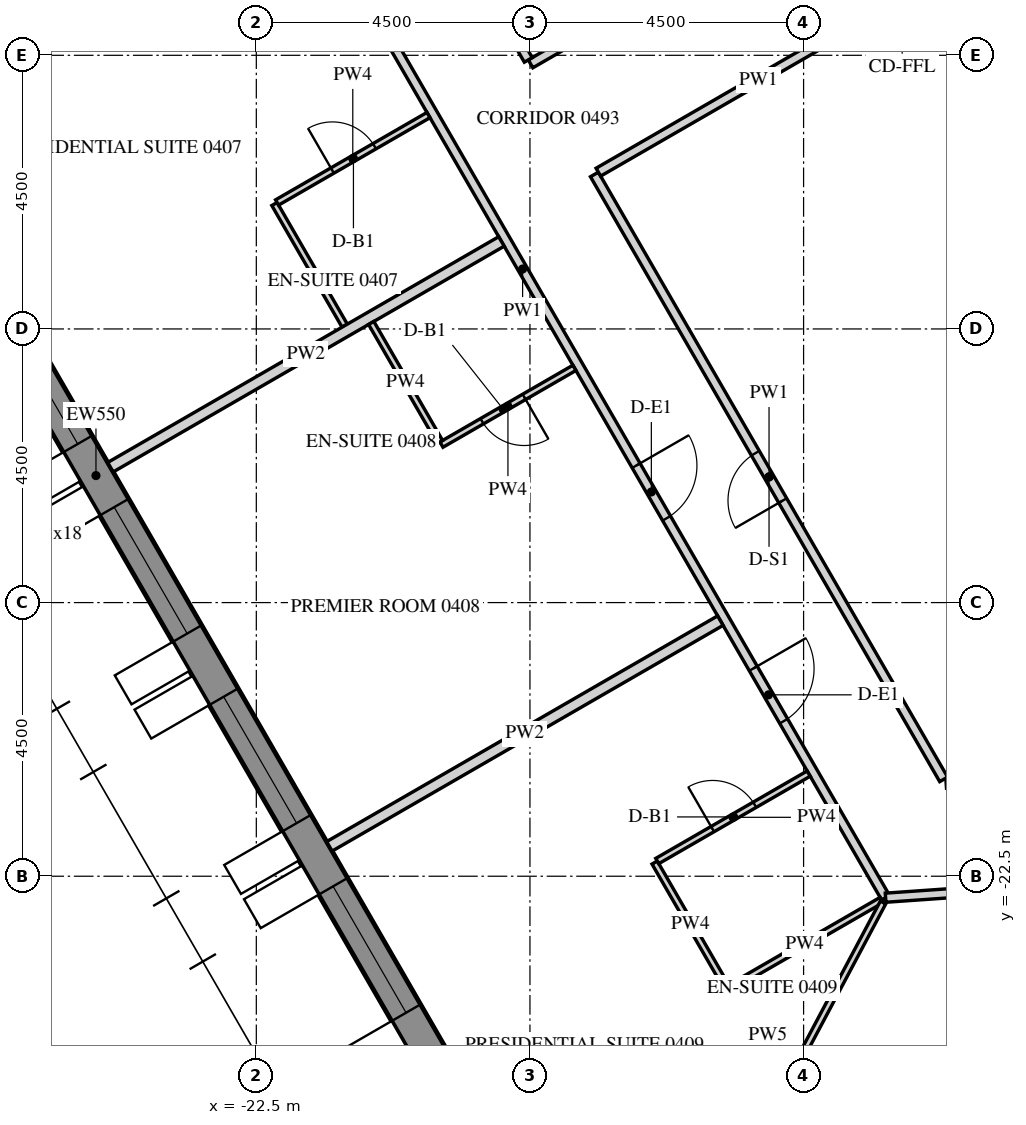
"""IFC4 building model, lengths in metres.
Left out: names, types, materials, properties, quantities, classifications, styles, units other than length and angle.
Written with IfcOpenShell. Run it as: python <this file> out.ifc"""

import sys

from ifc_helpers import new_model, si_unit, direction, frame, frame_2d, origin, place, context, subcontext, project, spatial, polyline, rectangle, outline, extrude, element, fill, save


model = new_model("IFC4")
c1 = context("Model", 3, precision=1e-05, world=origin(), true_north=direction((0.0, 1.0)))
c2 = subcontext(c1, "Body", "Model", "MODEL_VIEW")
j1 = project(units=[si_unit("LENGTHUNIT", "METRE"), si_unit("PLANEANGLEUNIT", "RADIAN")], contexts=[c1])
p1 = place(None, origin())
s1 = spatial("IfcSite", under=j1, at=p1, CompositionType="ELEMENT")
p2 = place(p1, origin())
s2 = spatial("IfcBuilding", under=s1, at=p2, CompositionType="ELEMENT")
p3 = place(p2, frame((0.0, 0.0, 68.7)))
s3 = spatial("IfcBuildingStorey", under=s2, at=p3, CompositionType="ELEMENT", Elevation=68.7)
p4 = place(p3, frame((-32.655, -2.89, -0.15), z_axis=(0.0, 0.0, 1.0), x_axis=(0.499997711317, -0.866026725152, 0.0)))
e1 = element("IfcWall", 1, at=p4, inside=s3, PredefinedType="SOLIDWALL", context=c2, shape_type="SweptSolid", body=[
    extrude(outline(polyline([(-0.022, -0.275), (30.097, -0.275), (30.045, 0.275), (0.022, 0.275), (-0.022, -0.275)])), origin(), (0.0, 0.0, 1.0), 3.9),
])
p5 = place(p4, frame((1.236, 0.0, 1.05)))
e2 = element("IfcOpeningElement", 2, at=p5, cuts=e1, PredefinedType="OPENING", context=c2, shape_type="SweptSolid", body=[
    extrude(rectangle(XDim=2.4, YDim=2.4, at=frame_2d((1.2, 1.2))), frame((0.0, 0.285, 0.0), z_axis=(0.0, -1.0, 0.0), x_axis=(1.0, 0.0, 0.0)), (0.0, 0.0, 1.0), 0.57),
])
p6 = place(p4, frame((4.835, 0.0, 1.05)))
e3 = element("IfcOpeningElement", 3, at=p6, cuts=e1, PredefinedType="OPENING", context=c2, shape_type="SweptSolid", body=[
    extrude(rectangle(XDim=2.4, YDim=2.4, at=frame_2d((1.2, 1.2))), frame((0.0, 0.285, 0.0), z_axis=(0.0, -1.0, 0.0), x_axis=(1.0, 0.0, 0.0)), (0.0, 0.0, 1.0), 0.57),
])
p7 = place(p4, frame((8.436, 0.0, 1.05)))
e4 = element("IfcOpeningElement", 4, at=p7, cuts=e1, PredefinedType="OPENING", context=c2, shape_type="SweptSolid", body=[
    extrude(rectangle(XDim=2.4, YDim=2.4, at=frame_2d((1.2, 1.2))), frame((0.0, 0.285, 0.0), z_axis=(0.0, -1.0, 0.0), x_axis=(1.0, 0.0, 0.0)), (0.0, 0.0, 1.0), 0.57),
])
p8 = place(p4, frame((12.035, 0.0, 1.05)))
e5 = element("IfcOpeningElement", 5, at=p8, cuts=e1, PredefinedType="OPENING", context=c2, shape_type="SweptSolid", body=[
    extrude(rectangle(XDim=2.4, YDim=2.4, at=frame_2d((1.2, 1.2))), frame((0.0, 0.285, 0.0), z_axis=(0.0, -1.0, 0.0), x_axis=(1.0, 0.0, 0.0)), (0.0, 0.0, 1.0), 0.57),
])
p9 = place(p4, frame((15.635, 0.0, 1.05)))
e6 = element("IfcOpeningElement", 6, at=p9, cuts=e1, PredefinedType="OPENING", context=c2, shape_type="SweptSolid", body=[
    extrude(rectangle(XDim=2.4, YDim=2.4, at=frame_2d((1.2, 1.2))), frame((0.0, 0.285, 0.0), z_axis=(0.0, -1.0, 0.0), x_axis=(1.0, 0.0, 0.0)), (0.0, 0.0, 1.0), 0.57),
])
p10 = place(p4, frame((19.236, 0.0, 1.05)))
e7 = element("IfcOpeningElement", 7, at=p10, cuts=e1, PredefinedType="OPENING", context=c2, shape_type="SweptSolid", body=[
    extrude(rectangle(XDim=2.4, YDim=2.4, at=frame_2d((1.2, 1.2))), frame((0.0, 0.285, 0.0), z_axis=(0.0, -1.0, 0.0), x_axis=(1.0, 0.0, 0.0)), (0.0, 0.0, 1.0), 0.57),
])
p11 = place(p4, frame((22.835, 0.0, 1.05)))
e8 = element("IfcOpeningElement", 8, at=p11, cuts=e1, PredefinedType="OPENING", context=c2, shape_type="SweptSolid", body=[
    extrude(rectangle(XDim=2.4, YDim=2.4, at=frame_2d((1.2, 1.2))), frame((0.0, 0.285, 0.0), z_axis=(0.0, -1.0, 0.0), x_axis=(1.0, 0.0, 0.0)), (0.0, 0.0, 1.0), 0.57),
])
p12 = place(p4, frame((26.436, 0.0, 1.05)))
e9 = element("IfcOpeningElement", 9, at=p12, cuts=e1, PredefinedType="OPENING", context=c2, shape_type="SweptSolid", body=[
    extrude(rectangle(XDim=2.4, YDim=2.4, at=frame_2d((1.2, 1.2))), frame((0.0, 0.285, 0.0), z_axis=(0.0, -1.0, 0.0), x_axis=(1.0, 0.0, 0.0)), (0.0, 0.0, 1.0), 0.57),
])
p13 = place(p3, frame((-15.819, 0.0, -0.15), z_axis=(0.0, 0.0, 1.0), x_axis=(0.499999880136, -0.866025472988, 0.0)))
e10 = element("IfcWall", 10, at=p13, inside=s3, PredefinedType="SHEAR", context=c2, shape_type="SweptSolid", body=[
    extrude(outline(polyline([(-0.173, -0.3), (15.993, -0.3), (15.646, 0.3), (0.173, 0.3), (-0.173, -0.3)])), origin(), (0.0, 0.0, 1.0), 3.9),
])
p14 = place(p13, frame((6.981, 0.0, 0.15)))
e11 = element("IfcOpeningElement", 11, at=p14, cuts=e10, PredefinedType="OPENING", context=c2, shape_type="SweptSolid", body=[
    extrude(rectangle(XDim=1.8, YDim=2.4, at=frame_2d((0.9, 1.2))), frame((0.0, 0.31, 0.0), z_axis=(0.0, -1.0, 0.0), x_axis=(1.0, 0.0, 0.0)), (0.0, 0.0, 1.0), 0.62),
])
p15 = place(p3, frame((-11.345, 0.0, -0.15), z_axis=(0.0, 0.0, 1.0), x_axis=(0.499995046907, -0.866028263435, 0.0)))
e12 = element("IfcWall", 12, at=p15, inside=s3, PredefinedType="SHEAR", context=c2, shape_type="SweptSolid", body=[
    extrude(outline(polyline([(-0.101, -0.175), (11.446, -0.175), (11.244, 0.175), (0.101, 0.175), (-0.101, -0.175)])), origin(), (0.0, 0.0, 1.0), 3.9),
])
p16 = place(p15, frame((4.744, 0.0, 0.15)))
e13 = element("IfcOpeningElement", 13, at=p16, cuts=e12, PredefinedType="OPENING", context=c2, shape_type="SweptSolid", body=[
    extrude(rectangle(XDim=1.8, YDim=2.4, at=frame_2d((0.9, 1.2))), frame((0.0, 0.185, 0.0), z_axis=(0.0, -1.0, 0.0), x_axis=(1.0, 0.0, 0.0)), (0.0, 0.0, 1.0), 0.37),
])
p17 = place(p3, frame((-24.09, -2.175, 0.0), z_axis=(0.0, 0.0, 1.0), x_axis=(0.499996832073, -0.86602723278, 0.0)))
e14 = element("IfcWall", 14, at=p17, inside=s3, PredefinedType="PARTITIONING", context=c2, shape_type="SweptSolid", body=[
    extrude(rectangle(XDim=23.877, YDim=0.15, at=frame_2d((11.938, 0.0))), origin(), (0.0, 0.0, 1.0), 2.988),
])
p18 = place(p17, frame((3.943, 0.0, 0.0)))
e15 = element("IfcOpeningElement", 15, at=p18, cuts=e14, PredefinedType="OPENING", context=c2, shape_type="SweptSolid", body=[
    extrude(rectangle(XDim=1.0, YDim=2.1, at=frame_2d((0.5, 1.05))), frame((0.0, 0.085, 0.0), z_axis=(0.0, -1.0, 0.0), x_axis=(1.0, 0.0, 0.0)), (0.0, 0.0, 1.0), 0.17),
])
p19 = place(p17, frame((15.672, 0.0, 0.0)))
e16 = element("IfcOpeningElement", 16, at=p19, cuts=e14, PredefinedType="OPENING", context=c2, shape_type="SweptSolid", body=[
    extrude(rectangle(XDim=1.0, YDim=2.1, at=frame_2d((0.5, 1.05))), frame((0.0, 0.085, 0.0), z_axis=(0.0, -1.0, 0.0), x_axis=(1.0, 0.0, 0.0)), (0.0, 0.0, 1.0), 0.17),
])
p20 = place(p17, frame((19.525, 0.0, 0.0)))
e17 = element("IfcOpeningElement", 17, at=p20, cuts=e14, PredefinedType="OPENING", context=c2, shape_type="SweptSolid", body=[
    extrude(rectangle(XDim=1.0, YDim=2.1, at=frame_2d((0.5, 1.05))), frame((0.0, 0.085, 0.0), z_axis=(0.0, -1.0, 0.0), x_axis=(1.0, 0.0, 0.0)), (0.0, 0.0, 1.0), 0.17),
])
p21 = place(p3, frame((-12.151, -22.853, 0.0), z_axis=(0.0, 0.0, 1.0), x_axis=(0.99756425444, 0.069753553767, 0.0)))
e18 = element("IfcWall", 18, at=p21, inside=s3, PredefinedType="PARTITIONING", context=c2, shape_type="SweptSolid", body=[
    extrude(rectangle(XDim=22.085, YDim=0.15, at=frame_2d((11.042, 0.0))), origin(), (0.0, 0.0, 1.0), 2.988),
])
p22 = place(p21, frame((7.205, 0.0, 0.0)))
e19 = element("IfcOpeningElement", 19, at=p22, cuts=e18, PredefinedType="OPENING", context=c2, shape_type="SweptSolid", body=[
    extrude(rectangle(XDim=1.0, YDim=2.1, at=frame_2d((0.5, 1.05))), frame((0.0, 0.085, 0.0), z_axis=(0.0, -1.0, 0.0), x_axis=(1.0, 0.0, 0.0)), (0.0, 0.0, 1.0), 0.17),
])
p23 = place(p21, frame((17.995, 0.0, 0.0)))
e20 = element("IfcOpeningElement", 20, at=p23, cuts=e18, PredefinedType="OPENING", context=c2, shape_type="SweptSolid", body=[
    extrude(rectangle(XDim=1.0, YDim=2.1, at=frame_2d((0.5, 1.05))), frame((0.0, 0.085, 0.0), z_axis=(0.0, -1.0, 0.0), x_axis=(1.0, 0.0, 0.0)), (0.0, 0.0, 1.0), 0.17),
])
p24 = place(p3, frame((-12.664, -6.066, 0.0), z_axis=(0.0, 0.0, 1.0), x_axis=(-0.866023618125, -0.500003092839, 0.0)))
e21 = element("IfcWall", 21, at=p24, inside=s3, PredefinedType="PARTITIONING", context=c2, shape_type="SweptSolid", body=[
    extrude(rectangle(XDim=6.15, YDim=0.15, at=frame_2d((3.075, 0.0))), origin(), (0.0, 0.0, 1.0), 2.988),
])
p25 = place(p3, frame((-18.027, -9.076, 0.0), z_axis=(0.0, 0.0, 1.0), x_axis=(-0.500007318041, 0.86602117867, 0.0)))
e22 = element("IfcWall", 22, at=p25, inside=s3, PredefinedType="PARTITIONING", context=c2, shape_type="SweptSolid", body=[
    extrude(rectangle(XDim=8.383, YDim=0.15, at=frame_2d((4.191, 0.0))), origin(), (0.0, 0.0, 1.0), 2.988),
])
p26 = place(p25, frame((3.742, 0.0, 0.0)))
e23 = element("IfcOpeningElement", 23, at=p26, cuts=e22, PredefinedType="OPENING", context=c2, shape_type="SweptSolid", body=[
    extrude(rectangle(XDim=0.9, YDim=2.1, at=frame_2d((0.45, 1.05))), frame((0.0, 0.085, 0.0), z_axis=(0.0, -1.0, 0.0), x_axis=(1.0, 0.0, 0.0)), (0.0, 0.0, 1.0), 0.17),
])
p27 = place(p3, frame((-0.825, -20.257, 0.0), z_axis=(0.0, 0.0, 1.0), x_axis=(-0.9975635143, -0.069764137903, 0.0)))
e24 = element("IfcWall", 24, at=p27, inside=s3, PredefinedType="PARTITIONING", context=c2, shape_type="SweptSolid", body=[
    extrude(rectangle(XDim=10.355, YDim=0.15, at=frame_2d((5.177, 0.0))), origin(), (0.0, 0.0, 1.0), 2.988),
])
p28 = place(p3, frame((-11.197, -20.907, 0.0), z_axis=(0.0, 0.0, 1.0), x_axis=(-0.500004557924, 0.86602277225, 0.0)))
e25 = element("IfcWall", 25, at=p28, inside=s3, PredefinedType="PARTITIONING", context=c2, shape_type="SweptSolid", body=[
    extrude(rectangle(XDim=11.487, YDim=0.15, at=frame_2d((5.743, 0.0))), origin(), (0.0, 0.0, 1.0), 2.988),
])
p29 = place(p28, frame((5.293, 0.0, 0.0)))
e26 = element("IfcOpeningElement", 26, at=p29, cuts=e25, PredefinedType="OPENING", context=c2, shape_type="SweptSolid", body=[
    extrude(rectangle(XDim=0.9, YDim=2.1, at=frame_2d((0.45, 1.05))), frame((0.0, 0.085, 0.0), z_axis=(0.0, -1.0, 0.0), x_axis=(1.0, 0.0, 0.0)), (0.0, 0.0, 1.0), 0.17),
])
p30 = place(p3, frame((-16.875, -10.922, 0.0), z_axis=(0.0, 0.0, 1.0), x_axis=(0.866023634079, 0.500003065207, 0.0)))
e27 = element("IfcWall", 27, at=p30, inside=s3, PredefinedType="PARTITIONING", context=c2, shape_type="SweptSolid", body=[
    extrude(rectangle(XDim=6.075, YDim=0.15, at=frame_2d((3.038, 0.0))), origin(), (0.0, 0.0, 1.0), 2.988),
])
p31 = place(p3, frame((-21.047, -13.446, 0.0), z_axis=(0.0, 0.0, 1.0), x_axis=(-0.500015210774, 0.866016621662, 0.0)))
e28 = element("IfcWall", 28, at=p31, inside=s3, PredefinedType="PARTITIONING", context=c2, shape_type="SweptSolid", body=[
    extrude(rectangle(XDim=2.31, YDim=0.1, at=frame_2d((1.155, 0.0))), origin(), (0.0, 0.0, 1.0), 2.988),
])
p32 = place(p3, frame((-22.158, -11.42, 0.0), z_axis=(0.0, 0.0, 1.0), x_axis=(0.866018712932, 0.500011588718, 0.0)))
e29 = element("IfcWall", 29, at=p32, inside=s3, PredefinedType="PARTITIONING", context=c2, shape_type="SweptSolid", body=[
    extrude(rectangle(XDim=2.875, YDim=0.1, at=frame_2d((1.438, 0.0))), origin(), (0.0, 0.0, 1.0), 2.988),
])
p33 = place(p32, frame((1.05, 0.0, 0.0)))
e30 = element("IfcOpeningElement", 30, at=p33, cuts=e29, PredefinedType="OPENING", context=c2, shape_type="SweptSolid", body=[
    extrude(rectangle(XDim=0.8, YDim=2.1, at=frame_2d((0.4, 1.05))), frame((0.0, 0.06, 0.0), z_axis=(0.0, -1.0, 0.0), x_axis=(1.0, 0.0, 0.0)), (0.0, 0.0, 1.0), 0.12),
])
p34 = place(p3, frame((-25.684, -7.913, 0.0), z_axis=(0.0, 0.0, 1.0), x_axis=(-0.866034226713, -0.499984717929, 0.0)))
e31 = element("IfcWall", 31, at=p34, inside=s3, PredefinedType="PARTITIONING", context=c2, shape_type="SweptSolid", body=[
    extrude(rectangle(XDim=3.25, YDim=0.1, at=frame_2d((1.625, 0.0))), origin(), (0.0, 0.0, 1.0), 2.988),
])
p35 = place(p3, frame((-24.899, -15.774, 0.0), z_axis=(0.0, 0.0, 1.0), x_axis=(0.866028983062, 0.499993800457, 0.0)))
e32 = element("IfcWall", 32, at=p35, inside=s3, PredefinedType="PARTITIONING", context=c2, shape_type="SweptSolid", body=[
    extrude(rectangle(XDim=7.425, YDim=0.18, at=frame_2d((3.712, 0.0))), origin(), (0.0, 0.0, 1.0), 2.988),
])
p36 = place(p3, frame((-17.269, -14.14, 0.0), z_axis=(0.0, 0.0, 1.0), x_axis=(-0.865973021571, -0.500090717682, 0.0)))
e33 = element("IfcWall", 33, at=p36, inside=s3, PredefinedType="PARTITIONING", context=c2, shape_type="SweptSolid", body=[
    extrude(rectangle(XDim=2.525, YDim=0.1, at=frame_2d((1.262, 0.0))), origin(), (0.0, 0.0, 1.0), 2.988),
])
p37 = place(p36, frame((0.955, 0.0, 0.0)))
e34 = element("IfcOpeningElement", 34, at=p37, cuts=e33, PredefinedType="OPENING", context=c2, shape_type="SweptSolid", body=[
    extrude(rectangle(XDim=0.8, YDim=2.1, at=frame_2d((0.4, 1.05))), frame((0.0, 0.06, 0.0), z_axis=(0.0, -1.0, 0.0), x_axis=(1.0, 0.0, 0.0)), (0.0, 0.0, 1.0), 0.12),
])
p38 = place(p3, frame((-19.48, -15.359, 0.0), z_axis=(0.0, 0.0, 1.0), x_axis=(-0.4999967785, 0.866027263711, 0.0)))
e35 = element("IfcWall", 35, at=p38, inside=s3, PredefinedType="PARTITIONING", context=c2, shape_type="SweptSolid", body=[
    extrude(rectangle(XDim=2.26, YDim=0.1, at=frame_2d((1.13, 0.0))), origin(), (0.0, 0.0, 1.0), 2.988),
])
p39 = place(p3, frame((-21.299, -22.009, 0.0), z_axis=(0.0, 0.0, 1.0), x_axis=(0.866014745021, 0.500018461065, 0.0)))
e36 = element("IfcWall", 36, at=p39, inside=s3, PredefinedType="PARTITIONING", context=c2, shape_type="SweptSolid", body=[
    extrude(rectangle(XDim=7.425, YDim=0.18, at=frame_2d((3.712, 0.0))), origin(), (0.0, 0.0, 1.0), 2.988),
])
p40 = place(p3, frame((-12.216, -22.891, 0.0), z_axis=(0.0, 0.0, 1.0), x_axis=(-0.866046596414, -0.499963291492, 0.0)))
e37 = element("IfcWall", 37, at=p40, inside=s3, PredefinedType="PARTITIONING", context=c2, shape_type="SweptSolid", body=[
    extrude(rectangle(XDim=2.925, YDim=0.1, at=frame_2d((1.462, 0.0))), origin(), (0.0, 0.0, 1.0), 2.988),
])
p41 = place(p3, frame((-14.774, -24.31, 0.0), z_axis=(0.0, 0.0, 1.0), x_axis=(-0.500016218704, 0.866016039709, 0.0)))
e38 = element("IfcWall", 38, at=p41, inside=s3, PredefinedType="PARTITIONING", context=c2, shape_type="SweptSolid", body=[
    extrude(rectangle(XDim=2.35, YDim=0.1, at=frame_2d((1.175, 0.0))), origin(), (0.0, 0.0, 1.0), 2.988),
])
p42 = place(p3, frame((-15.906, -22.25, 0.0), z_axis=(0.0, 0.0, 1.0), x_axis=(0.866018712932, 0.500011588718, 0.0)))
e39 = element("IfcWall", 39, at=p42, inside=s3, PredefinedType="PARTITIONING", context=c2, shape_type="SweptSolid", body=[
    extrude(rectangle(XDim=2.875, YDim=0.1, at=frame_2d((1.438, 0.0))), origin(), (0.0, 0.0, 1.0), 2.988),
])
p43 = place(p42, frame((1.05, 0.0, 0.0)))
e40 = element("IfcOpeningElement", 40, at=p43, cuts=e39, PredefinedType="OPENING", context=c2, shape_type="SweptSolid", body=[
    extrude(rectangle(XDim=0.8, YDim=2.1, at=frame_2d((0.4, 1.05))), frame((0.0, 0.06, 0.0), z_axis=(0.0, -1.0, 0.0), x_axis=(1.0, 0.0, 0.0)), (0.0, 0.0, 1.0), 0.12),
])
p44 = place(p3, frame((-15.983, -30.059, 0.0), z_axis=(0.0, 0.0, 1.0), x_axis=(0.469476547643, 0.882944942346, 0.0)))
e41 = element("IfcWall", 41, at=p44, inside=s3, PredefinedType="PARTITIONING", context=c2, shape_type="SweptSolid", body=[
    extrude(rectangle(XDim=8.073, YDim=0.1, at=frame_2d((4.037, 0.0))), origin(), (0.0, 0.0, 1.0), 2.988),
])
p45 = place(p44, frame((3.631, 0.0, 0.0)))
e42 = element("IfcOpeningElement", 42, at=p45, cuts=e41, PredefinedType="OPENING", context=c2, shape_type="SweptSolid", body=[
    extrude(rectangle(XDim=0.9, YDim=2.1, at=frame_2d((0.45, 1.05))), frame((0.0, 0.06, 0.0), z_axis=(0.0, -1.0, 0.0), x_axis=(1.0, 0.0, 0.0)), (0.0, 0.0, 1.0), 0.12),
])
p46 = place(p8, frame((0.0, 0.205, 0.0)))
e43 = element("IfcWindow", 43, at=p46, inside=s3, PartitioningType="DOUBLE_PANEL_VERTICAL", PredefinedType="WINDOW", context=c2, shape_type="SweptSolid", body=[
    extrude(rectangle(XDim=2.4, YDim=2.4, at=frame_2d((1.2, 1.2))), frame((0.0, 0.03, 0.0), z_axis=(0.0, -1.0, 0.0), x_axis=(1.0, 0.0, 0.0)), (0.0, 0.0, 1.0), 0.06),
])
fill(e5, e43)
p47 = place(p9, frame((0.0, 0.205, 0.0)))
e44 = element("IfcWindow", 44, at=p47, inside=s3, PartitioningType="DOUBLE_PANEL_VERTICAL", PredefinedType="WINDOW", context=c2, shape_type="SweptSolid", body=[
    extrude(rectangle(XDim=2.4, YDim=2.4, at=frame_2d((1.2, 1.2))), frame((0.0, 0.03, 0.0), z_axis=(0.0, -1.0, 0.0), x_axis=(1.0, 0.0, 0.0)), (0.0, 0.0, 1.0), 0.06),
])
fill(e6, e44)
p48 = place(p10, frame((0.0, 0.205, 0.0)))
e45 = element("IfcWindow", 45, at=p48, inside=s3, PartitioningType="DOUBLE_PANEL_VERTICAL", PredefinedType="WINDOW", context=c2, shape_type="SweptSolid", body=[
    extrude(rectangle(XDim=2.4, YDim=2.4, at=frame_2d((1.2, 1.2))), frame((0.0, 0.03, 0.0), z_axis=(0.0, -1.0, 0.0), x_axis=(1.0, 0.0, 0.0)), (0.0, 0.0, 1.0), 0.06),
])
fill(e7, e45)
p49 = place(p11, frame((0.0, 0.205, 0.0)))
e46 = element("IfcWindow", 46, at=p49, inside=s3, PartitioningType="DOUBLE_PANEL_VERTICAL", PredefinedType="WINDOW", context=c2, shape_type="SweptSolid", body=[
    extrude(rectangle(XDim=2.4, YDim=2.4, at=frame_2d((1.2, 1.2))), frame((0.0, 0.03, 0.0), z_axis=(0.0, -1.0, 0.0), x_axis=(1.0, 0.0, 0.0)), (0.0, 0.0, 1.0), 0.06),
])
fill(e8, e46)
p50 = place(p33, origin())
e47 = element("IfcDoor", 47, at=p50, inside=s3, OperationType="SINGLE_SWING_LEFT", PredefinedType="DOOR", context=c2, shape_type="SweptSolid", body=[
    extrude(rectangle(XDim=0.8, YDim=2.1, at=frame_2d((0.4, 1.05))), frame((0.0, 0.025, 0.0), z_axis=(0.0, -1.0, 0.0), x_axis=(1.0, 0.0, 0.0)), (0.0, 0.0, 1.0), 0.05),
])
fill(e30, e47)
p51 = place(p19, origin())
e48 = element("IfcDoor", 48, at=p51, inside=s3, OperationType="SINGLE_SWING_RIGHT", PredefinedType="DOOR", context=c2, shape_type="SweptSolid", body=[
    extrude(rectangle(XDim=1.0, YDim=2.1, at=frame_2d((0.5, 1.05))), frame((0.0, 0.025, 0.0), z_axis=(0.0, -1.0, 0.0), x_axis=(1.0, 0.0, 0.0)), (0.0, 0.0, 1.0), 0.05),
])
fill(e16, e48)
p52 = place(p37, origin())
e49 = element("IfcDoor", 49, at=p52, inside=s3, OperationType="SINGLE_SWING_LEFT", PredefinedType="DOOR", context=c2, shape_type="SweptSolid", body=[
    extrude(rectangle(XDim=0.8, YDim=2.1, at=frame_2d((0.4, 1.05))), frame((0.0, 0.025, 0.0), z_axis=(0.0, -1.0, 0.0), x_axis=(1.0, 0.0, 0.0)), (0.0, 0.0, 1.0), 0.05),
])
fill(e34, e49)
p53 = place(p20, origin())
e50 = element("IfcDoor", 50, at=p53, inside=s3, OperationType="SINGLE_SWING_RIGHT", PredefinedType="DOOR", context=c2, shape_type="SweptSolid", body=[
    extrude(rectangle(XDim=1.0, YDim=2.1, at=frame_2d((0.5, 1.05))), frame((0.0, 0.025, 0.0), z_axis=(0.0, -1.0, 0.0), x_axis=(1.0, 0.0, 0.0)), (0.0, 0.0, 1.0), 0.05),
])
fill(e17, e50)
p54 = place(p43, origin())
e51 = element("IfcDoor", 51, at=p54, inside=s3, OperationType="SINGLE_SWING_LEFT", PredefinedType="DOOR", context=c2, shape_type="SweptSolid", body=[
    extrude(rectangle(XDim=0.8, YDim=2.1, at=frame_2d((0.4, 1.05))), frame((0.0, 0.025, 0.0), z_axis=(0.0, -1.0, 0.0), x_axis=(1.0, 0.0, 0.0)), (0.0, 0.0, 1.0), 0.05),
])
fill(e40, e51)
p55 = place(p29, origin())
e52 = element("IfcDoor", 52, at=p55, inside=s3, OperationType="SINGLE_SWING_RIGHT", PredefinedType="DOOR", context=c2, shape_type="SweptSolid", body=[
    extrude(rectangle(XDim=0.9, YDim=2.1, at=frame_2d((0.45, 1.05))), frame((0.0, 0.025, 0.0), z_axis=(0.0, -1.0, 0.0), x_axis=(1.0, 0.0, 0.0)), (0.0, 0.0, 1.0), 0.05),
])
fill(e26, e52)
save(model, sys.argv[1])
